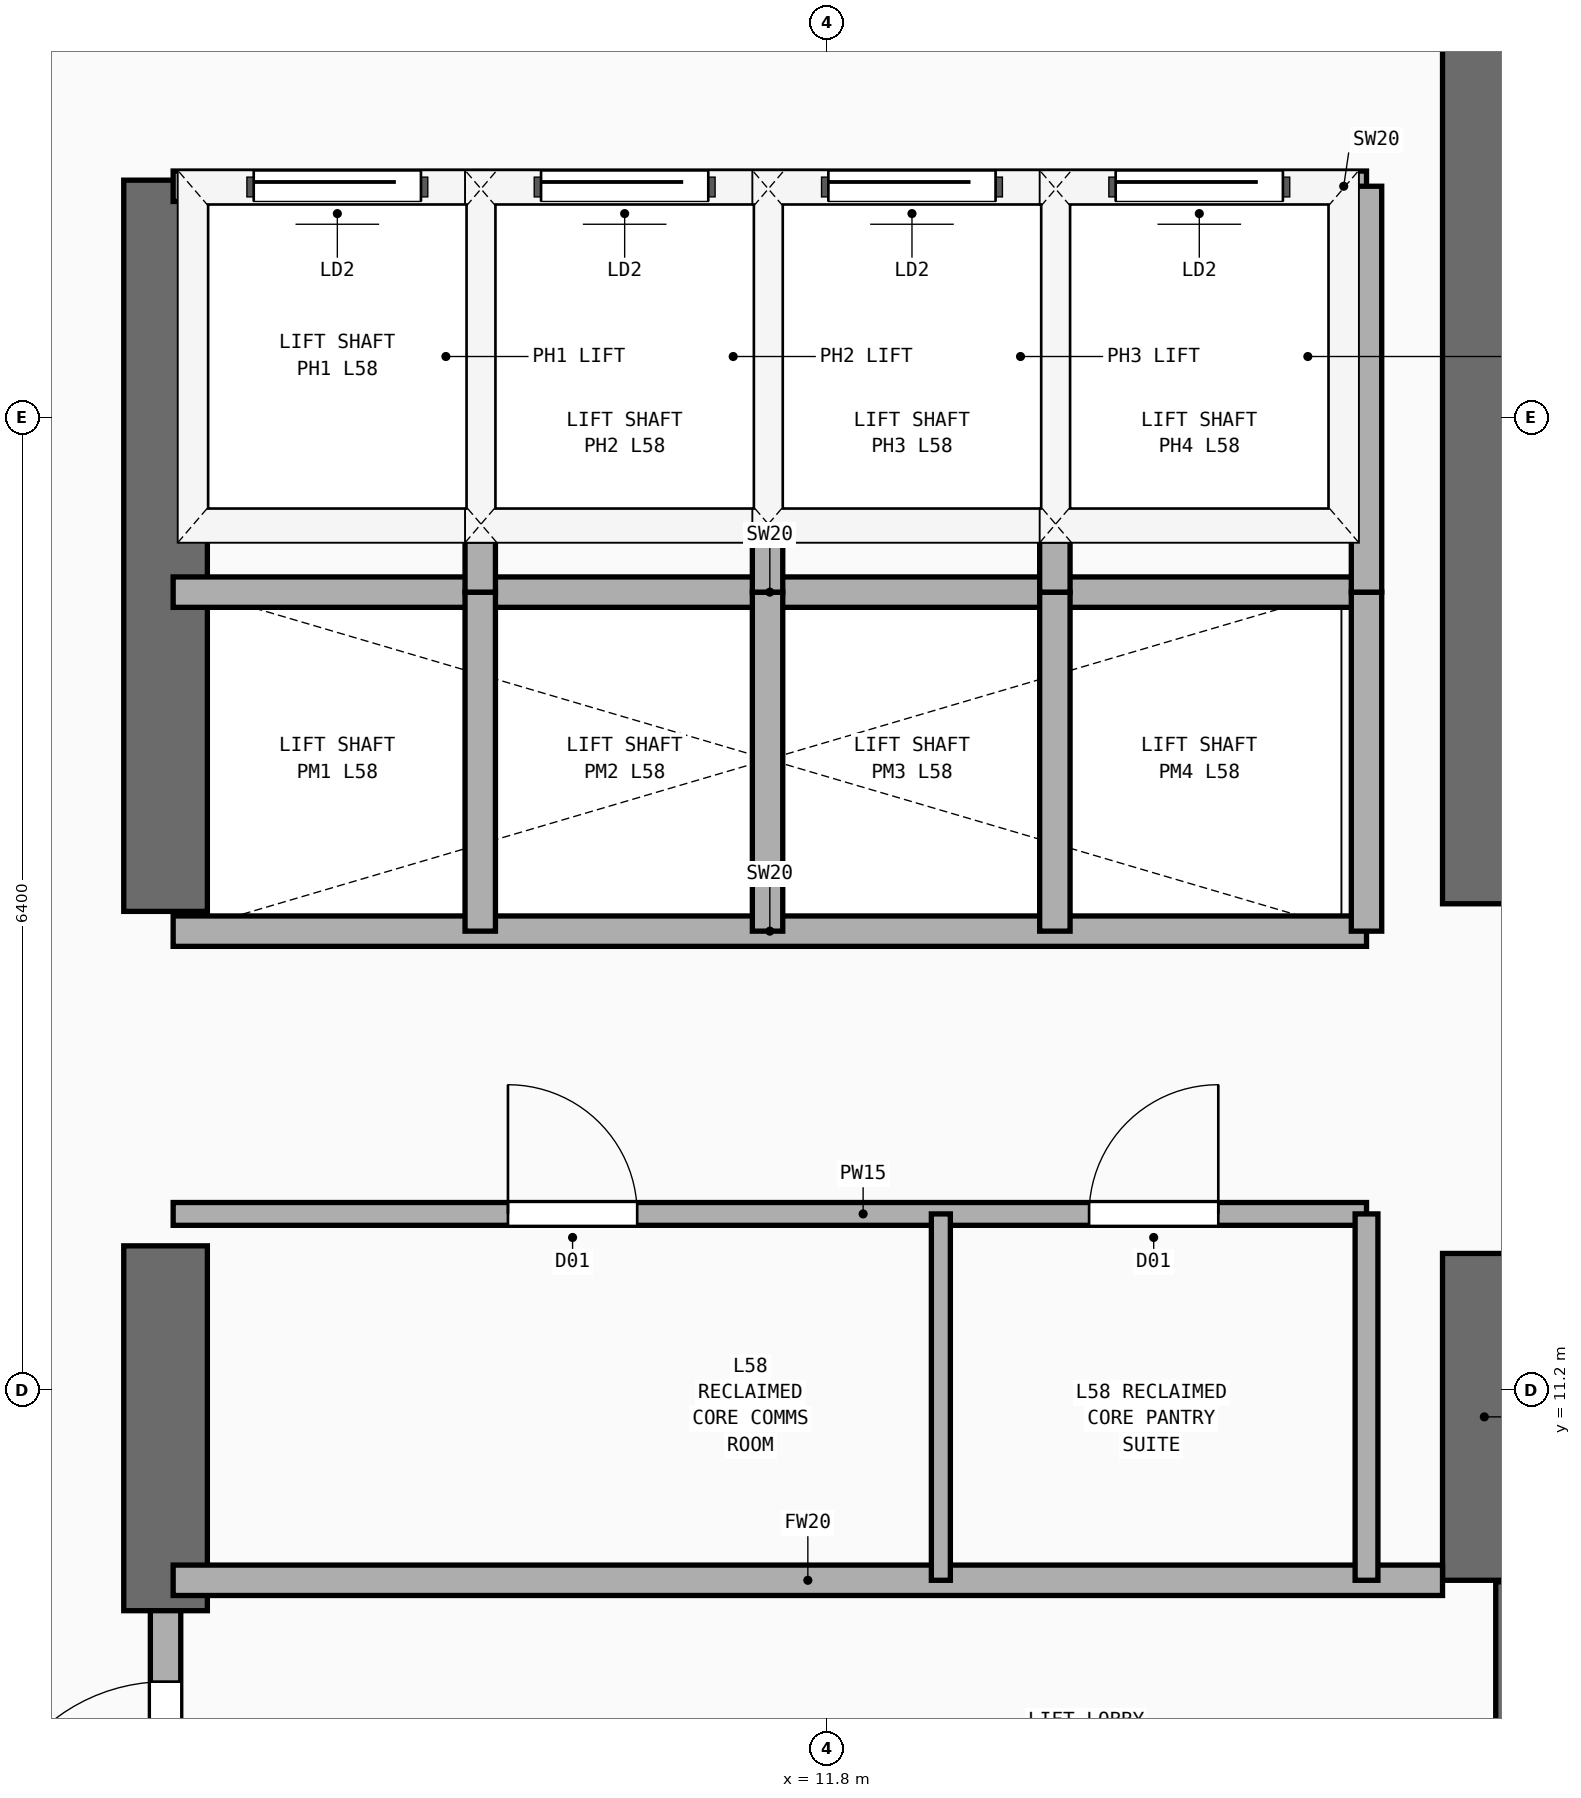
"""IFC4 building model, lengths in metres.
Left out: names, types, materials, properties, quantities, classifications, styles, units other than length and angle.
Written with IfcOpenShell. Run it as: python <this file> out.ifc"""

import sys

from ifc_helpers import new_model, si_unit, direction, frame, frame_2d, origin, place, context, subcontext, project, spatial, rectangle, extrude, element, fill, save


model = new_model("IFC4")
c1 = context("Model", 3, precision=1e-05, world=origin(), true_north=direction((0.0, 1.0)))
c2 = subcontext(c1, "Body", "Model", "MODEL_VIEW")
j1 = project(units=[si_unit("LENGTHUNIT", "METRE"), si_unit("PLANEANGLEUNIT", "RADIAN")], contexts=[c1])
p1 = place(None, origin())
s1 = spatial("IfcSite", under=j1, at=p1, CompositionType="ELEMENT")
p2 = place(p1, origin())
s2 = spatial("IfcBuilding", under=s1, at=p2, CompositionType="ELEMENT")
p3 = place(p2, frame((0.0, 0.0, 227.3)))
s3 = spatial("IfcBuildingStorey", under=s2, at=p3, CompositionType="ELEMENT", Elevation=227.3)
p4 = place(p3, frame((7.45, 9.75, 0.0), z_axis=(0.0, 0.0, 1.0), x_axis=(0.0, 1.0, 0.0)))
e1 = element("IfcWall", 1, at=p4, inside=s3, PredefinedType="SHEAR", context=c2, shape_type="SweptSolid", body=[
    extrude(rectangle(XDim=2.4, YDim=0.55, at=frame_2d((1.2, 0.0))), origin(), (0.0, 0.0, 1.0), 3.56),
])
p5 = place(p3, frame((7.45, 14.35, 0.0), z_axis=(0.0, 0.0, 1.0), x_axis=(0.0, 1.0, 0.0)))
e2 = element("IfcWall", 2, at=p5, inside=s3, PredefinedType="SHEAR", context=c2, shape_type="SweptSolid", body=[
    extrude(rectangle(XDim=4.81, YDim=0.55, at=frame_2d((2.405, 0.0))), origin(), (0.0, 0.0, 1.0), 3.56),
])
p6 = place(p3, frame((16.125, 9.95, 0.0), z_axis=(0.0, 0.0, 1.0), x_axis=(0.0, 1.0, 0.0)))
e3 = element("IfcWall", 3, at=p6, inside=s3, PredefinedType="SHEAR", context=c2, shape_type="SweptSolid", body=[
    extrude(rectangle(XDim=2.15, YDim=0.55, at=frame_2d((1.075, 0.0))), origin(), (0.0, 0.0, 1.0), 3.56),
])
p7 = place(p3, frame((16.125, 14.4, 0.0), z_axis=(0.0, 0.0, 1.0), x_axis=(0.0, 1.0, 0.0)))
e4 = element("IfcWall", 4, at=p7, inside=s3, PredefinedType="SHEAR", context=c2, shape_type="SweptSolid", body=[
    extrude(rectangle(XDim=9.1, YDim=0.55, at=frame_2d((4.55, 0.0))), origin(), (0.0, 0.0, 1.0), 3.56),
])
p8 = place(p3, frame((16.3, 7.36, 0.0), z_axis=(0.0, 0.0, 1.0), x_axis=(0.0, 1.0, 0.0)))
e5 = element("IfcWall", 5, at=p8, inside=s3, PredefinedType="SHEAR", context=c2, shape_type="SweptSolid", body=[
    extrude(rectangle(XDim=2.58, YDim=0.2, at=frame_2d((1.29, 0.0))), origin(), (0.0, 0.0, 1.0), 3.56),
])
p9 = place(p3, frame((7.5, 9.95, 0.0), z_axis=(0.0, 0.0, 1.0), x_axis=(1.0, 0.0, 0.0)))
e6 = element("IfcWall", 6, at=p9, inside=s3, PredefinedType="PARTITIONING", context=c2, shape_type="SweptSolid", body=[
    extrude(rectangle(XDim=8.35, YDim=0.2, at=frame_2d((4.175, 0.0))), origin(), (0.0, 0.0, 1.0), 3.56),
])
p10 = place(p3, frame((7.45, 7.45, 0.0), z_axis=(0.0, 0.0, 1.0), x_axis=(0.0, 1.0, 0.0)))
e7 = element("IfcWall", 7, at=p10, inside=s3, PredefinedType="PARTITIONING", context=c2, shape_type="SweptSolid", body=[
    extrude(rectangle(XDim=2.3, YDim=0.2, at=frame_2d((1.15, 0.0))), origin(), (0.0, 0.0, 1.0), 2.54),
])
p11 = place(p10, frame((0.633, 0.0, 0.0)))
e8 = element("IfcOpeningElement", 8, at=p11, cuts=e7, PredefinedType="OPENING", context=c2, shape_type="SweptSolid", body=[
    extrude(rectangle(XDim=1.2, YDim=2.25, at=frame_2d((0.6, 1.125))), frame((0.0, 0.11, 0.0), z_axis=(0.0, -1.0, 0.0), x_axis=(1.0, 0.0, 0.0)), (0.0, 0.0, 1.0), 0.22),
])
p12 = place(p3, frame((7.5, 12.36, 0.0), z_axis=(0.0, 0.0, 1.0), x_axis=(1.0, 0.0, 0.0)))
e9 = element("IfcWall", 9, at=p12, inside=s3, PredefinedType="PARTITIONING", context=c2, shape_type="SweptSolid", body=[
    extrude(rectangle(XDim=7.85, YDim=0.15, at=frame_2d((3.925, 0.0))), origin(), (0.0, 0.0, 1.0), 3.56),
])
p13 = place(p12, frame((2.202, 0.0, 0.0)))
e10 = element("IfcOpeningElement", 10, at=p13, cuts=e9, PredefinedType="OPENING", context=c2, shape_type="SweptSolid", body=[
    extrude(rectangle(XDim=0.85, YDim=2.15, at=frame_2d((0.425, 1.075))), frame((0.0, 0.085, 0.0), z_axis=(0.0, -1.0, 0.0), x_axis=(1.0, 0.0, 0.0)), (0.0, 0.0, 1.0), 0.17),
])
p14 = place(p12, frame((6.025, 0.0, 0.0)))
e11 = element("IfcOpeningElement", 11, at=p14, cuts=e9, PredefinedType="OPENING", context=c2, shape_type="SweptSolid", body=[
    extrude(rectangle(XDim=0.85, YDim=2.15, at=frame_2d((0.425, 1.075))), frame((0.0, 0.085, 0.0), z_axis=(0.0, -1.0, 0.0), x_axis=(1.0, 0.0, 0.0)), (0.0, 0.0, 1.0), 0.17),
])
p15 = place(p3, frame((15.35, 9.95, 0.0), z_axis=(0.0, 0.0, 1.0), x_axis=(0.0, 1.0, 0.0)))
e12 = element("IfcWall", 12, at=p15, inside=s3, PredefinedType="PARTITIONING", context=c2, shape_type="SweptSolid", body=[
    extrude(rectangle(XDim=2.41, YDim=0.15, at=frame_2d((1.205, 0.0))), origin(), (0.0, 0.0, 1.0), 3.56),
])
p16 = place(p3, frame((12.55, 9.95, 0.0), z_axis=(0.0, 0.0, 1.0), x_axis=(0.0, 1.0, 0.0)))
e13 = element("IfcWall", 13, at=p16, inside=s3, PredefinedType="PARTITIONING", context=c2, shape_type="SweptSolid", body=[
    extrude(rectangle(XDim=2.41, YDim=0.125, at=frame_2d((1.205, 0.0))), origin(), (0.0, 0.0, 1.0), 3.56),
])
for number, where, z_axis, x_axis in (
    (14, (7.5, 14.22, 0.0), (0.0, 0.0, 1.0), (1.0, 0.0, 0.0)),
    (15, (7.5, 16.45, 0.0), (0.0, 0.0, 1.0), (1.0, 0.0, 0.0)),
):
    element("IfcWall", number, at=place(p3, frame(where, z_axis=z_axis, x_axis=x_axis)), inside=s3, PredefinedType="PARTITIONING", context=c2, shape_type="SweptSolid", body=[
        extrude(rectangle(XDim=7.85, YDim=0.2, at=frame_2d((3.925, 0.0))), origin(), (0.0, 0.0, 1.0), 3.56),
    ])
for number, where, z_axis, x_axis in (
    (16, (15.35, 14.22, 0.0), (0.0, 0.0, 1.0), (0.0, 1.0, 0.0)),
    (17, (9.52, 14.22, 0.0), (0.0, 0.0, 1.0), (0.0, 1.0, 0.0)),
    (18, (11.41, 14.22, 0.0), (0.0, 0.0, 1.0), (0.0, 1.0, 0.0)),
    (19, (13.3, 14.22, 0.0), (0.0, 0.0, 1.0), (0.0, 1.0, 0.0)),
):
    element("IfcWall", number, at=place(p3, frame(where, z_axis=z_axis, x_axis=x_axis)), inside=s3, PredefinedType="PARTITIONING", context=c2, shape_type="SweptSolid", body=[
        extrude(rectangle(XDim=2.23, YDim=0.2, at=frame_2d((1.115, 0.0))), origin(), (0.0, 0.0, 1.0), 3.56),
    ])
p17 = place(p3, frame((7.5, 19.12, 0.0), z_axis=(0.0, 0.0, 1.0), x_axis=(1.0, 0.0, 0.0)))
e20 = element("IfcWall", 20, at=p17, inside=s3, PredefinedType="PARTITIONING", context=c2, shape_type="SweptSolid", body=[
    extrude(rectangle(XDim=7.85, YDim=0.2, at=frame_2d((3.925, 0.0))), origin(), (0.0, 0.0, 1.0), 3.56),
])
p18 = place(p17, frame((0.53, 0.0, 0.0)))
e21 = element("IfcOpeningElement", 21, at=p18, cuts=e20, PredefinedType="OPENING", context=c2, shape_type="SweptSolid", body=[
    extrude(rectangle(XDim=1.1, YDim=2.2, at=frame_2d((0.55, 1.1))), frame((0.0, 0.11, 0.0), z_axis=(0.0, -1.0, 0.0), x_axis=(1.0, 0.0, 0.0)), (0.0, 0.0, 1.0), 0.22),
])
p19 = place(p17, frame((2.42, 0.0, 0.0)))
e22 = element("IfcOpeningElement", 22, at=p19, cuts=e20, PredefinedType="OPENING", context=c2, shape_type="SweptSolid", body=[
    extrude(rectangle(XDim=1.1, YDim=2.2, at=frame_2d((0.55, 1.1))), frame((0.0, 0.11, 0.0), z_axis=(0.0, -1.0, 0.0), x_axis=(1.0, 0.0, 0.0)), (0.0, 0.0, 1.0), 0.22),
])
p20 = place(p17, frame((4.31, 0.0, 0.0)))
e23 = element("IfcOpeningElement", 23, at=p20, cuts=e20, PredefinedType="OPENING", context=c2, shape_type="SweptSolid", body=[
    extrude(rectangle(XDim=1.1, YDim=2.2, at=frame_2d((0.55, 1.1))), frame((0.0, 0.11, 0.0), z_axis=(0.0, -1.0, 0.0), x_axis=(1.0, 0.0, 0.0)), (0.0, 0.0, 1.0), 0.22),
])
p21 = place(p17, frame((6.2, 0.0, 0.0)))
e24 = element("IfcOpeningElement", 24, at=p21, cuts=e20, PredefinedType="OPENING", context=c2, shape_type="SweptSolid", body=[
    extrude(rectangle(XDim=1.1, YDim=2.2, at=frame_2d((0.55, 1.1))), frame((0.0, 0.11, 0.0), z_axis=(0.0, -1.0, 0.0), x_axis=(1.0, 0.0, 0.0)), (0.0, 0.0, 1.0), 0.22),
])
for number, where, z_axis, x_axis in (
    (25, (15.35, 16.45, 0.0), (0.0, 0.0, 1.0), (0.0, 1.0, 0.0)),
    (26, (9.52, 16.45, 0.0), (0.0, 0.0, 1.0), (0.0, 1.0, 0.0)),
    (27, (11.41, 16.45, 0.0), (0.0, 0.0, 1.0), (0.0, 1.0, 0.0)),
    (28, (13.3, 16.45, 0.0), (0.0, 0.0, 1.0), (0.0, 1.0, 0.0)),
):
    element("IfcWall", number, at=place(p3, frame(where, z_axis=z_axis, x_axis=x_axis)), inside=s3, PredefinedType="PARTITIONING", context=c2, shape_type="SweptSolid", body=[
        extrude(rectangle(XDim=2.67, YDim=0.2, at=frame_2d((1.335, 0.0))), origin(), (0.0, 0.0, 1.0), 3.56),
    ])
p22 = place(p11, frame((1.2, 0.0, 0.0), z_axis=(0.0, 0.0, 1.0), x_axis=(-1.0, 0.0, 0.0)))
e29 = element("IfcDoor", 29, at=p22, inside=s3, OperationType="SINGLE_SWING_RIGHT", PredefinedType="DOOR", context=c2, shape_type="SweptSolid", body=[
    extrude(rectangle(XDim=1.2, YDim=2.25, at=frame_2d((0.6, 1.125))), frame((0.0, 0.025, 0.0), z_axis=(0.0, -1.0, 0.0), x_axis=(1.0, 0.0, 0.0)), (0.0, 0.0, 1.0), 0.05),
])
fill(e8, e29)
p23 = place(p13, origin())
e30 = element("IfcDoor", 30, at=p23, inside=s3, OperationType="SINGLE_SWING_LEFT", PredefinedType="DOOR", context=c2, shape_type="SweptSolid", body=[
    extrude(rectangle(XDim=0.85, YDim=2.15, at=frame_2d((0.425, 1.075))), frame((0.0, 0.025, 0.0), z_axis=(0.0, -1.0, 0.0), x_axis=(1.0, 0.0, 0.0)), (0.0, 0.0, 1.0), 0.05),
])
fill(e10, e30)
p24 = place(p14, origin())
e31 = element("IfcDoor", 31, at=p24, inside=s3, OperationType="SINGLE_SWING_RIGHT", PredefinedType="DOOR", context=c2, shape_type="SweptSolid", body=[
    extrude(rectangle(XDim=0.85, YDim=2.15, at=frame_2d((0.425, 1.075))), frame((0.0, 0.025, 0.0), z_axis=(0.0, -1.0, 0.0), x_axis=(1.0, 0.0, 0.0)), (0.0, 0.0, 1.0), 0.05),
])
fill(e11, e31)
p25 = place(p18, origin())
e32 = element("IfcDoor", 32, at=p25, inside=s3, OperationType="SLIDING_TO_LEFT", PredefinedType="DOOR", context=c2, shape_type="SweptSolid", body=[
    extrude(rectangle(XDim=1.1, YDim=2.2, at=frame_2d((0.55, 1.1))), frame((0.0, 0.025, 0.0), z_axis=(0.0, -1.0, 0.0), x_axis=(1.0, 0.0, 0.0)), (0.0, 0.0, 1.0), 0.05),
])
fill(e21, e32)
p26 = place(p19, origin())
e33 = element("IfcDoor", 33, at=p26, inside=s3, OperationType="SLIDING_TO_LEFT", PredefinedType="DOOR", context=c2, shape_type="SweptSolid", body=[
    extrude(rectangle(XDim=1.1, YDim=2.2, at=frame_2d((0.55, 1.1))), frame((0.0, 0.025, 0.0), z_axis=(0.0, -1.0, 0.0), x_axis=(1.0, 0.0, 0.0)), (0.0, 0.0, 1.0), 0.05),
])
fill(e22, e33)
p27 = place(p20, origin())
e34 = element("IfcDoor", 34, at=p27, inside=s3, OperationType="SLIDING_TO_LEFT", PredefinedType="DOOR", context=c2, shape_type="SweptSolid", body=[
    extrude(rectangle(XDim=1.1, YDim=2.2, at=frame_2d((0.55, 1.1))), frame((0.0, 0.025, 0.0), z_axis=(0.0, -1.0, 0.0), x_axis=(1.0, 0.0, 0.0)), (0.0, 0.0, 1.0), 0.05),
])
fill(e23, e34)
p28 = place(p21, origin())
e35 = element("IfcDoor", 35, at=p28, inside=s3, OperationType="SLIDING_TO_LEFT", PredefinedType="DOOR", context=c2, shape_type="SweptSolid", body=[
    extrude(rectangle(XDim=1.1, YDim=2.2, at=frame_2d((0.55, 1.1))), frame((0.0, 0.025, 0.0), z_axis=(0.0, -1.0, 0.0), x_axis=(1.0, 0.0, 0.0)), (0.0, 0.0, 1.0), 0.05),
])
fill(e24, e35)
save(model, sys.argv[1])
